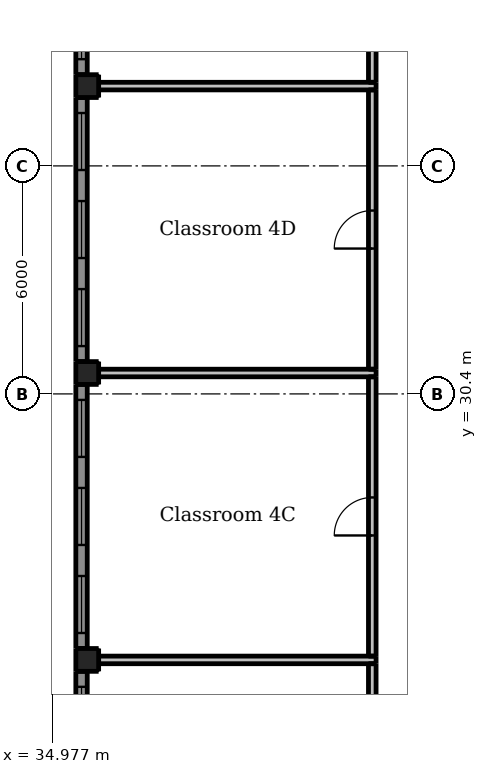
"""IFC4 building model, lengths in metres.
Left out: names, types, materials, properties, quantities, classifications, styles, units other than length and angle.
Written with IfcOpenShell. Run it as: python <this file> out.ifc"""

import sys

from ifc_helpers import new_model, si_unit, direction, frame, frame_2d, origin, origin_2d, place, context, subcontext, project, spatial, rectangle, extrude, element, fill, save


model = new_model("IFC4")
c1 = context("Model", 3, precision=1e-05, world=origin(), true_north=direction((0.0, 1.0)))
c2 = subcontext(c1, "Body", "Model", "MODEL_VIEW")
j1 = project(units=[si_unit("LENGTHUNIT", "METRE"), si_unit("PLANEANGLEUNIT", "RADIAN")], contexts=[c1])
p1 = place(None, origin())
s1 = spatial("IfcSite", under=j1, at=p1, CompositionType="ELEMENT")
p2 = place(p1, origin())
s2 = spatial("IfcBuilding", under=s1, at=p2, CompositionType="ELEMENT")
p3 = place(p2, frame((0.0, 0.0, 19.0)))
s3 = spatial("IfcBuildingStorey", under=s2, at=p3, CompositionType="ELEMENT", Elevation=19.0)
for number, where, z_axis, x_axis in (
    (1, (35.9, 23.4, -0.3), (0.0, 0.0, 1.0), (1.0, 0.0, 0.0)),
    (2, (35.9, 30.95, -0.3), (0.0, 0.0, 1.0), (1.0, 0.0, 0.0)),
    (3, (35.9, 38.5, -0.3), (0.0, 0.0, 1.0), (1.0, 0.0, 0.0)),
):
    element("IfcColumn", number, at=place(p3, frame(where, z_axis=z_axis, x_axis=x_axis)), inside=s3, PredefinedType="COLUMN", context=c2, shape_type="SweptSolid", body=[
        extrude(rectangle(XDim=0.6, YDim=0.6, at=origin_2d()), origin(), (0.0, 0.0, 1.0), 4.35),
    ])
p4 = place(p3, frame((35.75, 16.15, 0.0), z_axis=(0.0, 0.0, 1.0), x_axis=(0.0, 1.0, 0.0)))
e4 = element("IfcWall", 4, at=p4, inside=s3, PredefinedType="SOLIDWALL", context=c2, shape_type="SweptSolid", body=[
    extrude(rectangle(XDim=6.95, YDim=0.3, at=frame_2d((3.475, 0.0))), origin(), (0.0, 0.0, 1.0), 3.15),
])
p5 = place(p4, frame((0.408, 0.0, 0.9)))
e5 = element("IfcOpeningElement", 5, at=p5, cuts=e4, PredefinedType="OPENING", context=c2, shape_type="SweptSolid", body=[
    extrude(rectangle(XDim=1.5, YDim=1.5, at=frame_2d((0.75, 0.75))), frame((0.0, 0.16, 0.0), z_axis=(0.0, -1.0, 0.0), x_axis=(1.0, 0.0, 0.0)), (0.0, 0.0, 1.0), 0.32),
])
p6 = place(p4, frame((2.725, 0.0, 0.9)))
e6 = element("IfcOpeningElement", 6, at=p6, cuts=e4, PredefinedType="OPENING", context=c2, shape_type="SweptSolid", body=[
    extrude(rectangle(XDim=1.5, YDim=1.5, at=frame_2d((0.75, 0.75))), frame((0.0, 0.16, 0.0), z_axis=(0.0, -1.0, 0.0), x_axis=(1.0, 0.0, 0.0)), (0.0, 0.0, 1.0), 0.32),
])
p7 = place(p4, frame((5.042, 0.0, 0.9)))
e7 = element("IfcOpeningElement", 7, at=p7, cuts=e4, PredefinedType="OPENING", context=c2, shape_type="SweptSolid", body=[
    extrude(rectangle(XDim=1.5, YDim=1.5, at=frame_2d((0.75, 0.75))), frame((0.0, 0.16, 0.0), z_axis=(0.0, -1.0, 0.0), x_axis=(1.0, 0.0, 0.0)), (0.0, 0.0, 1.0), 0.32),
])
p8 = place(p3, frame((35.75, 23.7, 0.0), z_axis=(0.0, 0.0, 1.0), x_axis=(0.0, 1.0, 0.0)))
e8 = element("IfcWall", 8, at=p8, inside=s3, PredefinedType="SOLIDWALL", context=c2, shape_type="SweptSolid", body=[
    extrude(rectangle(XDim=6.95, YDim=0.3, at=frame_2d((3.475, 0.0))), origin(), (0.0, 0.0, 1.0), 3.15),
])
p9 = place(p8, frame((0.408, 0.0, 0.9)))
e9 = element("IfcOpeningElement", 9, at=p9, cuts=e8, PredefinedType="OPENING", context=c2, shape_type="SweptSolid", body=[
    extrude(rectangle(XDim=1.5, YDim=1.5, at=frame_2d((0.75, 0.75))), frame((0.0, 0.16, 0.0), z_axis=(0.0, -1.0, 0.0), x_axis=(1.0, 0.0, 0.0)), (0.0, 0.0, 1.0), 0.32),
])
p10 = place(p8, frame((2.725, 0.0, 0.9)))
e10 = element("IfcOpeningElement", 10, at=p10, cuts=e8, PredefinedType="OPENING", context=c2, shape_type="SweptSolid", body=[
    extrude(rectangle(XDim=1.5, YDim=1.5, at=frame_2d((0.75, 0.75))), frame((0.0, 0.16, 0.0), z_axis=(0.0, -1.0, 0.0), x_axis=(1.0, 0.0, 0.0)), (0.0, 0.0, 1.0), 0.32),
])
p11 = place(p8, frame((5.042, 0.0, 0.9)))
e11 = element("IfcOpeningElement", 11, at=p11, cuts=e8, PredefinedType="OPENING", context=c2, shape_type="SweptSolid", body=[
    extrude(rectangle(XDim=1.5, YDim=1.5, at=frame_2d((0.75, 0.75))), frame((0.0, 0.16, 0.0), z_axis=(0.0, -1.0, 0.0), x_axis=(1.0, 0.0, 0.0)), (0.0, 0.0, 1.0), 0.32),
])
p12 = place(p3, frame((35.75, 31.25, 0.0), z_axis=(0.0, 0.0, 1.0), x_axis=(0.0, 1.0, 0.0)))
e12 = element("IfcWall", 12, at=p12, inside=s3, PredefinedType="SOLIDWALL", context=c2, shape_type="SweptSolid", body=[
    extrude(rectangle(XDim=6.95, YDim=0.3, at=frame_2d((3.475, 0.0))), origin(), (0.0, 0.0, 1.0), 3.15),
])
p13 = place(p12, frame((0.408, 0.0, 0.9)))
e13 = element("IfcOpeningElement", 13, at=p13, cuts=e12, PredefinedType="OPENING", context=c2, shape_type="SweptSolid", body=[
    extrude(rectangle(XDim=1.5, YDim=1.5, at=frame_2d((0.75, 0.75))), frame((0.0, 0.16, 0.0), z_axis=(0.0, -1.0, 0.0), x_axis=(1.0, 0.0, 0.0)), (0.0, 0.0, 1.0), 0.32),
])
p14 = place(p12, frame((2.725, 0.0, 0.9)))
e14 = element("IfcOpeningElement", 14, at=p14, cuts=e12, PredefinedType="OPENING", context=c2, shape_type="SweptSolid", body=[
    extrude(rectangle(XDim=1.5, YDim=1.5, at=frame_2d((0.75, 0.75))), frame((0.0, 0.16, 0.0), z_axis=(0.0, -1.0, 0.0), x_axis=(1.0, 0.0, 0.0)), (0.0, 0.0, 1.0), 0.32),
])
p15 = place(p12, frame((5.042, 0.0, 0.9)))
e15 = element("IfcOpeningElement", 15, at=p15, cuts=e12, PredefinedType="OPENING", context=c2, shape_type="SweptSolid", body=[
    extrude(rectangle(XDim=1.5, YDim=1.5, at=frame_2d((0.75, 0.75))), frame((0.0, 0.16, 0.0), z_axis=(0.0, -1.0, 0.0), x_axis=(1.0, 0.0, 0.0)), (0.0, 0.0, 1.0), 0.32),
])
p16 = place(p3, frame((35.75, 38.8, 0.0), z_axis=(0.0, 0.0, 1.0), x_axis=(0.0, 1.0, 0.0)))
e16 = element("IfcWall", 16, at=p16, inside=s3, PredefinedType="SOLIDWALL", context=c2, shape_type="SweptSolid", body=[
    extrude(rectangle(XDim=6.95, YDim=0.3, at=frame_2d((3.475, 0.0))), origin(), (0.0, 0.0, 1.0), 3.15),
])
p17 = place(p16, frame((0.408, 0.0, 0.9)))
e17 = element("IfcOpeningElement", 17, at=p17, cuts=e16, PredefinedType="OPENING", context=c2, shape_type="SweptSolid", body=[
    extrude(rectangle(XDim=1.5, YDim=1.5, at=frame_2d((0.75, 0.75))), frame((0.0, 0.16, 0.0), z_axis=(0.0, -1.0, 0.0), x_axis=(1.0, 0.0, 0.0)), (0.0, 0.0, 1.0), 0.32),
])
p18 = place(p16, frame((2.725, 0.0, 0.9)))
e18 = element("IfcOpeningElement", 18, at=p18, cuts=e16, PredefinedType="OPENING", context=c2, shape_type="SweptSolid", body=[
    extrude(rectangle(XDim=1.5, YDim=1.5, at=frame_2d((0.75, 0.75))), frame((0.0, 0.16, 0.0), z_axis=(0.0, -1.0, 0.0), x_axis=(1.0, 0.0, 0.0)), (0.0, 0.0, 1.0), 0.32),
])
p19 = place(p16, frame((5.042, 0.0, 0.9)))
e19 = element("IfcOpeningElement", 19, at=p19, cuts=e16, PredefinedType="OPENING", context=c2, shape_type="SweptSolid", body=[
    extrude(rectangle(XDim=1.5, YDim=1.5, at=frame_2d((0.75, 0.75))), frame((0.0, 0.16, 0.0), z_axis=(0.0, -1.0, 0.0), x_axis=(1.0, 0.0, 0.0)), (0.0, 0.0, 1.0), 0.32),
])
p20 = place(p3, frame((43.4, 15.95, 0.0), z_axis=(0.0, 0.0, 1.0), x_axis=(0.0, 1.0, 0.0)))
e20 = element("IfcWall", 20, at=p20, inside=s3, PredefinedType="PARTITIONING", context=c2, shape_type="SweptSolid", body=[
    extrude(rectangle(XDim=7.35, YDim=0.2, at=frame_2d((3.675, 0.0))), origin(), (0.0, 0.0, 1.0), 2.85),
])
p21 = place(p20, frame((3.175, 0.0, 0.0)))
e21 = element("IfcOpeningElement", 21, at=p21, cuts=e20, PredefinedType="OPENING", context=c2, shape_type="SweptSolid", body=[
    extrude(rectangle(XDim=1.0, YDim=2.1, at=frame_2d((0.5, 1.05))), frame((0.0, 0.11, 0.0), z_axis=(0.0, -1.0, 0.0), x_axis=(1.0, 0.0, 0.0)), (0.0, 0.0, 1.0), 0.22),
])
p22 = place(p3, frame((43.4, 23.5, 0.0), z_axis=(0.0, 0.0, 1.0), x_axis=(0.0, 1.0, 0.0)))
e22 = element("IfcWall", 22, at=p22, inside=s3, PredefinedType="PARTITIONING", context=c2, shape_type="SweptSolid", body=[
    extrude(rectangle(XDim=7.35, YDim=0.2, at=frame_2d((3.675, 0.0))), origin(), (0.0, 0.0, 1.0), 2.85),
])
p23 = place(p22, frame((3.175, 0.0, 0.0)))
e23 = element("IfcOpeningElement", 23, at=p23, cuts=e22, PredefinedType="OPENING", context=c2, shape_type="SweptSolid", body=[
    extrude(rectangle(XDim=1.0, YDim=2.1, at=frame_2d((0.5, 1.05))), frame((0.0, 0.11, 0.0), z_axis=(0.0, -1.0, 0.0), x_axis=(1.0, 0.0, 0.0)), (0.0, 0.0, 1.0), 0.22),
])
p24 = place(p3, frame((43.4, 31.05, 0.0), z_axis=(0.0, 0.0, 1.0), x_axis=(0.0, 1.0, 0.0)))
e24 = element("IfcWall", 24, at=p24, inside=s3, PredefinedType="PARTITIONING", context=c2, shape_type="SweptSolid", body=[
    extrude(rectangle(XDim=7.35, YDim=0.2, at=frame_2d((3.675, 0.0))), origin(), (0.0, 0.0, 1.0), 2.85),
])
p25 = place(p24, frame((3.175, 0.0, 0.0)))
e25 = element("IfcOpeningElement", 25, at=p25, cuts=e24, PredefinedType="OPENING", context=c2, shape_type="SweptSolid", body=[
    extrude(rectangle(XDim=1.0, YDim=2.1, at=frame_2d((0.5, 1.05))), frame((0.0, 0.11, 0.0), z_axis=(0.0, -1.0, 0.0), x_axis=(1.0, 0.0, 0.0)), (0.0, 0.0, 1.0), 0.22),
])
p26 = place(p3, frame((43.4, 38.6, 0.0), z_axis=(0.0, 0.0, 1.0), x_axis=(0.0, 1.0, 0.0)))
e26 = element("IfcWall", 26, at=p26, inside=s3, PredefinedType="PARTITIONING", context=c2, shape_type="SweptSolid", body=[
    extrude(rectangle(XDim=7.35, YDim=0.2, at=frame_2d((3.675, 0.0))), origin(), (0.0, 0.0, 1.0), 2.85),
])
p27 = place(p26, frame((3.175, 0.0, 0.0)))
e27 = element("IfcOpeningElement", 27, at=p27, cuts=e26, PredefinedType="OPENING", context=c2, shape_type="SweptSolid", body=[
    extrude(rectangle(XDim=1.0, YDim=2.1, at=frame_2d((0.5, 1.05))), frame((0.0, 0.11, 0.0), z_axis=(0.0, -1.0, 0.0), x_axis=(1.0, 0.0, 0.0)), (0.0, 0.0, 1.0), 0.22),
])
for number, where, z_axis, x_axis in (
    (28, (36.2, 23.4, 0.0), (0.0, 0.0, 1.0), (1.0, 0.0, 0.0)),
    (29, (36.2, 30.95, 0.0), (0.0, 0.0, 1.0), (1.0, 0.0, 0.0)),
    (30, (36.2, 38.5, 0.0), (0.0, 0.0, 1.0), (1.0, 0.0, 0.0)),
):
    element("IfcWall", number, at=place(p3, frame(where, z_axis=z_axis, x_axis=x_axis)), inside=s3, PredefinedType="PARTITIONING", context=c2, shape_type="SweptSolid", body=[
        extrude(rectangle(XDim=7.3, YDim=0.2, at=frame_2d((3.65, 0.0))), origin(), (0.0, 0.0, 1.0), 2.85),
    ])
p28 = place(p7, origin())
e31 = element("IfcWindow", 31, at=p28, inside=s3, PartitioningType="DOUBLE_PANEL_HORIZONTAL", PredefinedType="WINDOW", context=c2, shape_type="SweptSolid", body=[
    extrude(rectangle(XDim=1.5, YDim=1.5, at=frame_2d((0.75, 0.75))), frame((0.0, 0.03, 0.0), z_axis=(0.0, -1.0, 0.0), x_axis=(1.0, 0.0, 0.0)), (0.0, 0.0, 1.0), 0.06),
])
fill(e7, e31)
p29 = place(p9, origin())
e32 = element("IfcWindow", 32, at=p29, inside=s3, PartitioningType="DOUBLE_PANEL_HORIZONTAL", PredefinedType="WINDOW", context=c2, shape_type="SweptSolid", body=[
    extrude(rectangle(XDim=1.5, YDim=1.5, at=frame_2d((0.75, 0.75))), frame((0.0, 0.03, 0.0), z_axis=(0.0, -1.0, 0.0), x_axis=(1.0, 0.0, 0.0)), (0.0, 0.0, 1.0), 0.06),
])
fill(e9, e32)
p30 = place(p10, origin())
e33 = element("IfcWindow", 33, at=p30, inside=s3, PartitioningType="DOUBLE_PANEL_HORIZONTAL", PredefinedType="WINDOW", context=c2, shape_type="SweptSolid", body=[
    extrude(rectangle(XDim=1.5, YDim=1.5, at=frame_2d((0.75, 0.75))), frame((0.0, 0.03, 0.0), z_axis=(0.0, -1.0, 0.0), x_axis=(1.0, 0.0, 0.0)), (0.0, 0.0, 1.0), 0.06),
])
fill(e10, e33)
p31 = place(p11, origin())
e34 = element("IfcWindow", 34, at=p31, inside=s3, PartitioningType="DOUBLE_PANEL_HORIZONTAL", PredefinedType="WINDOW", context=c2, shape_type="SweptSolid", body=[
    extrude(rectangle(XDim=1.5, YDim=1.5, at=frame_2d((0.75, 0.75))), frame((0.0, 0.03, 0.0), z_axis=(0.0, -1.0, 0.0), x_axis=(1.0, 0.0, 0.0)), (0.0, 0.0, 1.0), 0.06),
])
fill(e11, e34)
p32 = place(p13, origin())
e35 = element("IfcWindow", 35, at=p32, inside=s3, PartitioningType="DOUBLE_PANEL_HORIZONTAL", PredefinedType="WINDOW", context=c2, shape_type="SweptSolid", body=[
    extrude(rectangle(XDim=1.5, YDim=1.5, at=frame_2d((0.75, 0.75))), frame((0.0, 0.03, 0.0), z_axis=(0.0, -1.0, 0.0), x_axis=(1.0, 0.0, 0.0)), (0.0, 0.0, 1.0), 0.06),
])
fill(e13, e35)
p33 = place(p14, origin())
e36 = element("IfcWindow", 36, at=p33, inside=s3, PartitioningType="DOUBLE_PANEL_HORIZONTAL", PredefinedType="WINDOW", context=c2, shape_type="SweptSolid", body=[
    extrude(rectangle(XDim=1.5, YDim=1.5, at=frame_2d((0.75, 0.75))), frame((0.0, 0.03, 0.0), z_axis=(0.0, -1.0, 0.0), x_axis=(1.0, 0.0, 0.0)), (0.0, 0.0, 1.0), 0.06),
])
fill(e14, e36)
p34 = place(p15, origin())
e37 = element("IfcWindow", 37, at=p34, inside=s3, PartitioningType="DOUBLE_PANEL_HORIZONTAL", PredefinedType="WINDOW", context=c2, shape_type="SweptSolid", body=[
    extrude(rectangle(XDim=1.5, YDim=1.5, at=frame_2d((0.75, 0.75))), frame((0.0, 0.03, 0.0), z_axis=(0.0, -1.0, 0.0), x_axis=(1.0, 0.0, 0.0)), (0.0, 0.0, 1.0), 0.06),
])
fill(e15, e37)
p35 = place(p17, origin())
e38 = element("IfcWindow", 38, at=p35, inside=s3, PartitioningType="DOUBLE_PANEL_HORIZONTAL", PredefinedType="WINDOW", context=c2, shape_type="SweptSolid", body=[
    extrude(rectangle(XDim=1.5, YDim=1.5, at=frame_2d((0.75, 0.75))), frame((0.0, 0.03, 0.0), z_axis=(0.0, -1.0, 0.0), x_axis=(1.0, 0.0, 0.0)), (0.0, 0.0, 1.0), 0.06),
])
fill(e17, e38)
p36 = place(p23, origin())
e39 = element("IfcDoor", 39, at=p36, inside=s3, OperationType="SINGLE_SWING_LEFT", PredefinedType="DOOR", context=c2, shape_type="SweptSolid", body=[
    extrude(rectangle(XDim=1.0, YDim=2.1, at=frame_2d((0.5, 1.05))), frame((0.0, 0.025, 0.0), z_axis=(0.0, -1.0, 0.0), x_axis=(1.0, 0.0, 0.0)), (0.0, 0.0, 1.0), 0.05),
])
fill(e23, e39)
p37 = place(p25, origin())
e40 = element("IfcDoor", 40, at=p37, inside=s3, OperationType="SINGLE_SWING_LEFT", PredefinedType="DOOR", context=c2, shape_type="SweptSolid", body=[
    extrude(rectangle(XDim=1.0, YDim=2.1, at=frame_2d((0.5, 1.05))), frame((0.0, 0.025, 0.0), z_axis=(0.0, -1.0, 0.0), x_axis=(1.0, 0.0, 0.0)), (0.0, 0.0, 1.0), 0.05),
])
fill(e25, e40)
save(model, sys.argv[1])
